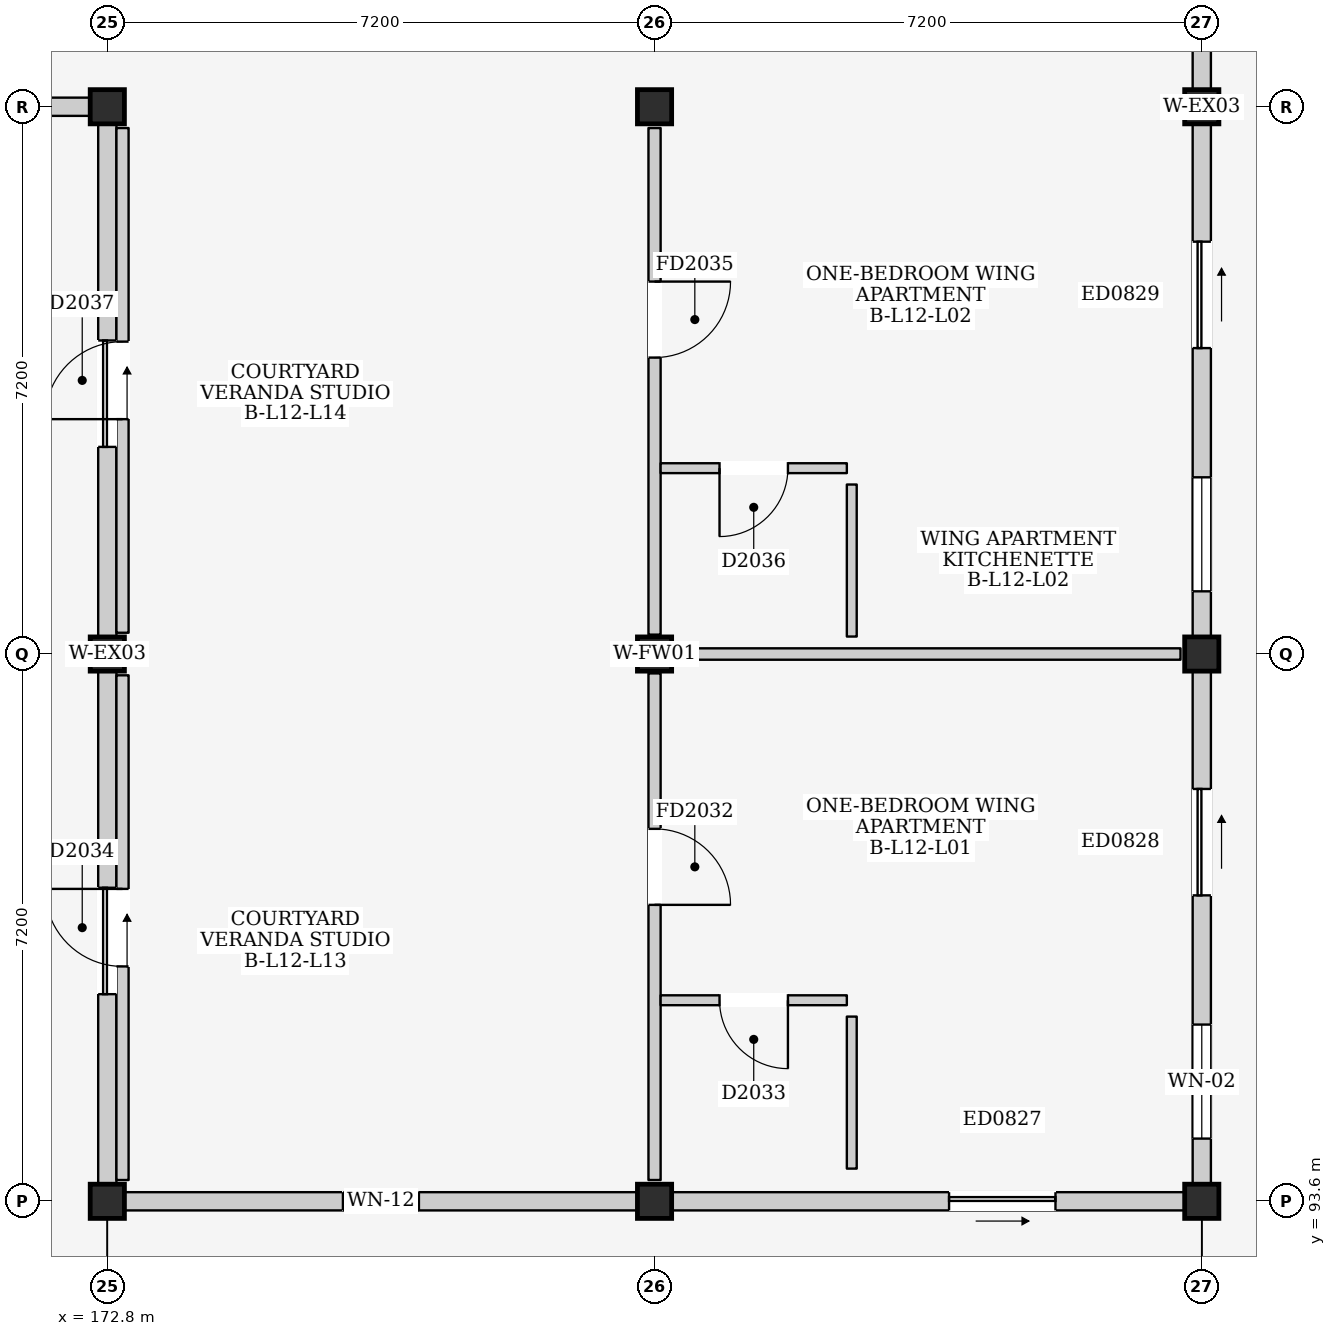
"""IFC4 building model, lengths in metres.
Left out: names, types, materials, properties, quantities, classifications, styles, units other than length and angle.
Written with IfcOpenShell. Run it as: python <this file> out.ifc"""

import sys

from ifc_helpers import new_model, si_unit, direction, frame, frame_2d, origin, origin_2d, place, context, subcontext, project, spatial, rectangle, extrude, element, fill, save


model = new_model("IFC4")
c1 = context("Model", 3, precision=1e-05, world=origin(), true_north=direction((0.0, 1.0)))
c2 = subcontext(c1, "Body", "Model", "MODEL_VIEW")
j1 = project(units=[si_unit("LENGTHUNIT", "METRE"), si_unit("PLANEANGLEUNIT", "RADIAN")], contexts=[c1])
p1 = place(None, origin())
s1 = spatial("IfcSite", under=j1, at=p1, CompositionType="ELEMENT")
p2 = place(p1, origin())
s2 = spatial("IfcBuilding", under=s1, at=p2, CompositionType="ELEMENT")
p3 = place(p2, frame((0.0, 0.0, 41.2)))
s3 = spatial("IfcBuildingStorey", under=s2, at=p3, CompositionType="ELEMENT", Elevation=41.2)
for number, where, z_axis, x_axis in (
    (1, (172.8, 93.6, 0.0), (0.0, 0.0, 1.0), (1.0, 0.0, 0.0)),
    (2, (172.8, 100.8, 0.0), (0.0, 0.0, 1.0), (1.0, 0.0, 0.0)),
    (3, (172.8, 108.0, 0.0), (0.0, 0.0, 1.0), (1.0, 0.0, 0.0)),
    (4, (180.0, 93.6, 0.0), (0.0, 0.0, 1.0), (1.0, 0.0, 0.0)),
    (5, (180.0, 100.8, 0.0), (0.0, 0.0, 1.0), (1.0, 0.0, 0.0)),
    (6, (180.0, 108.0, 0.0), (0.0, 0.0, 1.0), (1.0, 0.0, 0.0)),
    (7, (187.2, 93.6, 0.0), (0.0, 0.0, 1.0), (1.0, 0.0, 0.0)),
    (8, (187.2, 100.8, 0.0), (0.0, 0.0, 1.0), (1.0, 0.0, 0.0)),
    (9, (187.2, 108.0, 0.0), (0.0, 0.0, 1.0), (1.0, 0.0, 0.0)),
):
    element("IfcColumn", number, at=place(p3, frame(where, z_axis=z_axis, x_axis=x_axis)), inside=s3, PredefinedType="COLUMN", context=c2, shape_type="SweptSolid", body=[
        extrude(rectangle(XDim=0.45, YDim=0.45, at=origin_2d()), origin(), (0.0, 0.0, 1.0), 3.2),
    ])
p4 = place(p3, frame((165.825, 108.0, 0.0), z_axis=(0.0, 0.0, 1.0), x_axis=(1.0, 0.0, 0.0)))
e10 = element("IfcWall", 10, at=p4, inside=s3, PredefinedType="ELEMENTEDWALL", context=c2, shape_type="SweptSolid", body=[
    extrude(rectangle(XDim=6.75, YDim=0.24, at=frame_2d((3.375, 0.0))), origin(), (0.0, 0.0, 1.0), 2.345),
])
p5 = place(p4, frame((2.875, 0.0, 1.2)))
e11 = element("IfcOpeningElement", 11, at=p5, cuts=e10, PredefinedType="OPENING", context=c2, shape_type="SweptSolid", body=[
    extrude(rectangle(XDim=1.0, YDim=0.9, at=frame_2d((0.5, 0.45))), frame((0.0, 0.135, 0.0), z_axis=(0.0, -1.0, 0.0), x_axis=(1.0, 0.0, 0.0)), (0.0, 0.0, 1.0), 0.27),
])
p6 = place(p3, frame((173.025, 93.6, 0.0), z_axis=(0.0, 0.0, 1.0), x_axis=(1.0, 0.0, 0.0)))
e12 = element("IfcWall", 12, at=p6, inside=s3, PredefinedType="ELEMENTEDWALL", context=c2, shape_type="SweptSolid", body=[
    extrude(rectangle(XDim=6.75, YDim=0.24, at=frame_2d((3.375, 0.0))), origin(), (0.0, 0.0, 1.0), 2.345),
])
p7 = place(p6, frame((2.875, 0.0, 1.1)))
e13 = element("IfcOpeningElement", 13, at=p7, cuts=e12, PredefinedType="OPENING", context=c2, shape_type="SweptSolid", body=[
    extrude(rectangle(XDim=1.0, YDim=0.9, at=frame_2d((0.5, 0.45))), frame((0.0, 0.135, 0.0), z_axis=(0.0, -1.0, 0.0), x_axis=(1.0, 0.0, 0.0)), (0.0, 0.0, 1.0), 0.27),
])
p8 = place(p3, frame((172.8, 93.825, 0.0), z_axis=(0.0, 0.0, 1.0), x_axis=(0.0, 1.0, 0.0)))
e14 = element("IfcWall", 14, at=p8, inside=s3, PredefinedType="ELEMENTEDWALL", context=c2, shape_type="SweptSolid", body=[
    extrude(rectangle(XDim=6.75, YDim=0.24, at=frame_2d((3.375, 0.0))), origin(), (0.0, 0.0, 1.0), 2.445),
])
p9 = place(p8, frame((2.5, 0.0, 0.0)))
e15 = element("IfcOpeningElement", 15, at=p9, cuts=e14, PredefinedType="OPENING", context=c2, shape_type="SweptSolid", body=[
    extrude(rectangle(XDim=1.4, YDim=2.1, at=frame_2d((0.7, 1.05))), frame((0.0, 0.135, 0.0), z_axis=(0.0, -1.0, 0.0), x_axis=(1.0, 0.0, 0.0)), (0.0, 0.0, 1.0), 0.27),
])
p10 = place(p3, frame((172.8, 101.025, 0.0), z_axis=(0.0, 0.0, 1.0), x_axis=(0.0, 1.0, 0.0)))
e16 = element("IfcWall", 16, at=p10, inside=s3, PredefinedType="ELEMENTEDWALL", context=c2, shape_type="SweptSolid", body=[
    extrude(rectangle(XDim=6.75, YDim=0.24, at=frame_2d((3.375, 0.0))), origin(), (0.0, 0.0, 1.0), 2.445),
])
p11 = place(p10, frame((2.5, 0.0, 0.0)))
e17 = element("IfcOpeningElement", 17, at=p11, cuts=e16, PredefinedType="OPENING", context=c2, shape_type="SweptSolid", body=[
    extrude(rectangle(XDim=1.4, YDim=2.1, at=frame_2d((0.7, 1.05))), frame((0.0, 0.135, 0.0), z_axis=(0.0, -1.0, 0.0), x_axis=(1.0, 0.0, 0.0)), (0.0, 0.0, 1.0), 0.27),
])
p12 = place(p3, frame((180.225, 93.6, 0.0), z_axis=(0.0, 0.0, 1.0), x_axis=(1.0, 0.0, 0.0)))
e18 = element("IfcWall", 18, at=p12, inside=s3, PredefinedType="ELEMENTEDWALL", context=c2, shape_type="SweptSolid", body=[
    extrude(rectangle(XDim=6.75, YDim=0.24, at=frame_2d((3.375, 0.0))), origin(), (0.0, 0.0, 1.0), 2.345),
])
p13 = place(p12, frame((3.65, 0.0, 0.0)))
e19 = element("IfcOpeningElement", 19, at=p13, cuts=e18, PredefinedType="OPENING", context=c2, shape_type="SweptSolid", body=[
    extrude(rectangle(XDim=1.4, YDim=2.1, at=frame_2d((0.7, 1.05))), frame((0.0, 0.135, 0.0), z_axis=(0.0, -1.0, 0.0), x_axis=(1.0, 0.0, 0.0)), (0.0, 0.0, 1.0), 0.27),
])
p14 = place(p3, frame((187.2, 93.825, 0.0), z_axis=(0.0, 0.0, 1.0), x_axis=(0.0, 1.0, 0.0)))
e20 = element("IfcWall", 20, at=p14, inside=s3, PredefinedType="ELEMENTEDWALL", context=c2, shape_type="SweptSolid", body=[
    extrude(rectangle(XDim=6.75, YDim=0.24, at=frame_2d((3.375, 0.0))), origin(), (0.0, 0.0, 1.0), 2.495),
])
p15 = place(p14, frame((3.8, 0.0, 0.0)))
e21 = element("IfcOpeningElement", 21, at=p15, cuts=e20, PredefinedType="OPENING", context=c2, shape_type="SweptSolid", body=[
    extrude(rectangle(XDim=1.4, YDim=2.1, at=frame_2d((0.7, 1.05))), frame((0.0, 0.135, 0.0), z_axis=(0.0, -1.0, 0.0), x_axis=(1.0, 0.0, 0.0)), (0.0, 0.0, 1.0), 0.27),
])
p16 = place(p14, frame((0.6, 0.0, 0.88)))
e22 = element("IfcOpeningElement", 22, at=p16, cuts=e20, PredefinedType="OPENING", context=c2, shape_type="SweptSolid", body=[
    extrude(rectangle(XDim=1.5, YDim=1.5, at=frame_2d((0.75, 0.75))), frame((0.0, 0.135, 0.0), z_axis=(0.0, -1.0, 0.0), x_axis=(1.0, 0.0, 0.0)), (0.0, 0.0, 1.0), 0.27),
])
p17 = place(p3, frame((187.2, 101.025, 0.0), z_axis=(0.0, 0.0, 1.0), x_axis=(0.0, 1.0, 0.0)))
e23 = element("IfcWall", 23, at=p17, inside=s3, PredefinedType="ELEMENTEDWALL", context=c2, shape_type="SweptSolid", body=[
    extrude(rectangle(XDim=6.75, YDim=0.24, at=frame_2d((3.375, 0.0))), origin(), (0.0, 0.0, 1.0), 2.495),
])
p18 = place(p17, frame((3.8, 0.0, 0.0)))
e24 = element("IfcOpeningElement", 24, at=p18, cuts=e23, PredefinedType="OPENING", context=c2, shape_type="SweptSolid", body=[
    extrude(rectangle(XDim=1.4, YDim=2.1, at=frame_2d((0.7, 1.05))), frame((0.0, 0.135, 0.0), z_axis=(0.0, -1.0, 0.0), x_axis=(1.0, 0.0, 0.0)), (0.0, 0.0, 1.0), 0.27),
])
p19 = place(p17, frame((0.6, 0.0, 0.88)))
e25 = element("IfcOpeningElement", 25, at=p19, cuts=e23, PredefinedType="OPENING", context=c2, shape_type="SweptSolid", body=[
    extrude(rectangle(XDim=1.5, YDim=1.5, at=frame_2d((0.75, 0.75))), frame((0.0, 0.135, 0.0), z_axis=(0.0, -1.0, 0.0), x_axis=(1.0, 0.0, 0.0)), (0.0, 0.0, 1.0), 0.27),
])
p20 = place(p3, frame((187.2, 108.225, 0.0), z_axis=(0.0, 0.0, 1.0), x_axis=(0.0, 1.0, 0.0)))
e26 = element("IfcWall", 26, at=p20, inside=s3, PredefinedType="ELEMENTEDWALL", context=c2, shape_type="SweptSolid", body=[
    extrude(rectangle(XDim=6.75, YDim=0.24, at=frame_2d((3.375, 0.0))), origin(), (0.0, 0.0, 1.0), 2.495),
])
p21 = place(p20, frame((3.65, 0.0, 0.0)))
e27 = element("IfcOpeningElement", 27, at=p21, cuts=e26, PredefinedType="OPENING", context=c2, shape_type="SweptSolid", body=[
    extrude(rectangle(XDim=1.4, YDim=2.1, at=frame_2d((0.7, 1.05))), frame((0.0, 0.135, 0.0), z_axis=(0.0, -1.0, 0.0), x_axis=(1.0, 0.0, 0.0)), (0.0, 0.0, 1.0), 0.27),
])
p22 = place(p3, frame((180.0, 93.88, 0.0), z_axis=(0.0, 0.0, 1.0), x_axis=(0.0, 1.0, 0.0)))
e28 = element("IfcWall", 28, at=p22, inside=s3, PredefinedType="PARTITIONING", context=c2, shape_type="SweptSolid", body=[
    extrude(rectangle(XDim=6.665, YDim=0.16, at=frame_2d((3.333, 0.0))), origin(), (0.0, 0.0, 1.0), 2.445),
])
p23 = place(p22, frame((3.62, 0.0, 0.0)))
e29 = element("IfcOpeningElement", 29, at=p23, cuts=e28, PredefinedType="OPENING", context=c2, shape_type="SweptSolid", body=[
    extrude(rectangle(XDim=1.0, YDim=2.15, at=frame_2d((0.5, 1.075))), frame((0.0, 0.095, 0.0), z_axis=(0.0, -1.0, 0.0), x_axis=(1.0, 0.0, 0.0)), (0.0, 0.0, 1.0), 0.19),
])
p24 = place(p3, frame((180.28, 100.8, 0.0), z_axis=(0.0, 0.0, 1.0), x_axis=(1.0, 0.0, 0.0)))
e30 = element("IfcWall", 30, at=p24, inside=s3, PredefinedType="PARTITIONING", context=c2, shape_type="SweptSolid", body=[
    extrude(rectangle(XDim=6.64, YDim=0.15, at=frame_2d((3.32, 0.0))), origin(), (0.0, 0.0, 1.0), 2.345),
])
p25 = place(p3, frame((180.08, 96.245, 0.0), z_axis=(0.0, 0.0, 1.0), x_axis=(1.0, 0.0, 0.0)))
e31 = element("IfcWall", 31, at=p25, inside=s3, PredefinedType="PARTITIONING", context=c2, shape_type="SweptSolid", body=[
    extrude(rectangle(XDim=2.45, YDim=0.13, at=frame_2d((1.225, 0.0))), origin(), (0.0, 0.0, 1.0), 2.95),
])
p26 = place(p25, frame((0.775, 0.0, 0.0)))
e32 = element("IfcOpeningElement", 32, at=p26, cuts=e31, PredefinedType="OPENING", context=c2, shape_type="SweptSolid", body=[
    extrude(rectangle(XDim=0.9, YDim=2.1, at=frame_2d((0.45, 1.05))), frame((0.0, 0.08, 0.0), z_axis=(0.0, -1.0, 0.0), x_axis=(1.0, 0.0, 0.0)), (0.0, 0.0, 1.0), 0.16),
])
p27 = place(p3, frame((182.595, 94.03, 0.0), z_axis=(0.0, 0.0, 1.0), x_axis=(0.0, 1.0, 0.0)))
e33 = element("IfcWall", 33, at=p27, inside=s3, PredefinedType="PARTITIONING", context=c2, shape_type="SweptSolid", body=[
    extrude(rectangle(XDim=2.0, YDim=0.13, at=frame_2d((1.0, 0.0))), origin(), (0.0, 0.0, 1.0), 2.95),
])
p28 = place(p3, frame((173.0, 93.88, 0.0), z_axis=(0.0, 0.0, 1.0), x_axis=(0.0, 1.0, 0.0)))
e34 = element("IfcWall", 34, at=p28, inside=s3, PredefinedType="PARTITIONING", context=c2, shape_type="SweptSolid", body=[
    extrude(rectangle(XDim=6.64, YDim=0.16, at=frame_2d((3.32, 0.0))), origin(), (0.0, 0.0, 1.0), 2.95),
])
p29 = place(p28, frame((2.81, 0.0, 0.0)))
e35 = element("IfcOpeningElement", 35, at=p29, cuts=e34, PredefinedType="OPENING", context=c2, shape_type="SweptSolid", body=[
    extrude(rectangle(XDim=1.02, YDim=2.18, at=frame_2d((0.51, 1.09))), frame((0.0, 0.095, 0.0), z_axis=(0.0, -1.0, 0.0), x_axis=(1.0, 0.0, 0.0)), (0.0, 0.0, 1.0), 0.19),
])
p30 = place(p3, frame((180.0, 101.055, 0.0), z_axis=(0.0, 0.0, 1.0), x_axis=(0.0, 1.0, 0.0)))
e36 = element("IfcWall", 36, at=p30, inside=s3, PredefinedType="PARTITIONING", context=c2, shape_type="SweptSolid", body=[
    extrude(rectangle(XDim=6.665, YDim=0.16, at=frame_2d((3.333, 0.0))), origin(), (0.0, 0.0, 1.0), 2.445),
])
p31 = place(p30, frame((3.645, 0.0, 0.0)))
e37 = element("IfcOpeningElement", 37, at=p31, cuts=e36, PredefinedType="OPENING", context=c2, shape_type="SweptSolid", body=[
    extrude(rectangle(XDim=1.0, YDim=2.15, at=frame_2d((0.5, 1.075))), frame((0.0, 0.095, 0.0), z_axis=(0.0, -1.0, 0.0), x_axis=(1.0, 0.0, 0.0)), (0.0, 0.0, 1.0), 0.19),
])
p32 = place(p3, frame((180.08, 103.245, 0.0), z_axis=(0.0, 0.0, 1.0), x_axis=(1.0, 0.0, 0.0)))
e38 = element("IfcWall", 38, at=p32, inside=s3, PredefinedType="PARTITIONING", context=c2, shape_type="SweptSolid", body=[
    extrude(rectangle(XDim=2.45, YDim=0.13, at=frame_2d((1.225, 0.0))), origin(), (0.0, 0.0, 1.0), 2.95),
])
p33 = place(p32, frame((0.775, 0.0, 0.0)))
e39 = element("IfcOpeningElement", 39, at=p33, cuts=e38, PredefinedType="OPENING", context=c2, shape_type="SweptSolid", body=[
    extrude(rectangle(XDim=0.9, YDim=2.1, at=frame_2d((0.45, 1.05))), frame((0.0, 0.08, 0.0), z_axis=(0.0, -1.0, 0.0), x_axis=(1.0, 0.0, 0.0)), (0.0, 0.0, 1.0), 0.16),
])
p34 = place(p3, frame((182.595, 101.03, 0.0), z_axis=(0.0, 0.0, 1.0), x_axis=(0.0, 1.0, 0.0)))
e40 = element("IfcWall", 40, at=p34, inside=s3, PredefinedType="PARTITIONING", context=c2, shape_type="SweptSolid", body=[
    extrude(rectangle(XDim=2.0, YDim=0.13, at=frame_2d((1.0, 0.0))), origin(), (0.0, 0.0, 1.0), 2.95),
])
p35 = place(p3, frame((173.0, 101.08, 0.0), z_axis=(0.0, 0.0, 1.0), x_axis=(0.0, 1.0, 0.0)))
e41 = element("IfcWall", 41, at=p35, inside=s3, PredefinedType="PARTITIONING", context=c2, shape_type="SweptSolid", body=[
    extrude(rectangle(XDim=6.64, YDim=0.16, at=frame_2d((3.32, 0.0))), origin(), (0.0, 0.0, 1.0), 2.95),
])
p36 = place(p35, frame((2.81, 0.0, 0.0)))
e42 = element("IfcOpeningElement", 42, at=p36, cuts=e41, PredefinedType="OPENING", context=c2, shape_type="SweptSolid", body=[
    extrude(rectangle(XDim=1.02, YDim=2.18, at=frame_2d((0.51, 1.09))), frame((0.0, 0.095, 0.0), z_axis=(0.0, -1.0, 0.0), x_axis=(1.0, 0.0, 0.0)), (0.0, 0.0, 1.0), 0.19),
])
p37 = place(p7, origin())
e43 = element("IfcWindow", 43, at=p37, inside=s3, PartitioningType="SINGLE_PANEL", PredefinedType="WINDOW", context=c2, shape_type="SweptSolid", body=[
    extrude(rectangle(XDim=1.0, YDim=0.9, at=frame_2d((0.5, 0.45))), frame((0.0, 0.03, 0.0), z_axis=(0.0, -1.0, 0.0), x_axis=(1.0, 0.0, 0.0)), (0.0, 0.0, 1.0), 0.06),
])
fill(e13, e43)
p38 = place(p9, frame((1.4, 0.0, 0.0), z_axis=(0.0, 0.0, 1.0), x_axis=(-1.0, 0.0, 0.0)))
e44 = element("IfcDoor", 44, at=p38, inside=s3, OperationType="SLIDING_TO_RIGHT", PredefinedType="DOOR", context=c2, shape_type="SweptSolid", body=[
    extrude(rectangle(XDim=1.4, YDim=2.1, at=frame_2d((0.7, 1.05))), frame((0.0, 0.025, 0.0), z_axis=(0.0, -1.0, 0.0), x_axis=(1.0, 0.0, 0.0)), (0.0, 0.0, 1.0), 0.05),
])
fill(e15, e44)
p39 = place(p11, frame((1.4, 0.0, 0.0), z_axis=(0.0, 0.0, 1.0), x_axis=(-1.0, 0.0, 0.0)))
e45 = element("IfcDoor", 45, at=p39, inside=s3, OperationType="SLIDING_TO_RIGHT", PredefinedType="DOOR", context=c2, shape_type="SweptSolid", body=[
    extrude(rectangle(XDim=1.4, YDim=2.1, at=frame_2d((0.7, 1.05))), frame((0.0, 0.025, 0.0), z_axis=(0.0, -1.0, 0.0), x_axis=(1.0, 0.0, 0.0)), (0.0, 0.0, 1.0), 0.05),
])
fill(e17, e45)
p40 = place(p13, frame((1.4, 0.0, 0.0), z_axis=(0.0, 0.0, 1.0), x_axis=(-1.0, 0.0, 0.0)))
e46 = element("IfcDoor", 46, at=p40, inside=s3, OperationType="SLIDING_TO_RIGHT", PredefinedType="DOOR", context=c2, shape_type="SweptSolid", body=[
    extrude(rectangle(XDim=1.4, YDim=2.1, at=frame_2d((0.7, 1.05))), frame((0.0, 0.025, 0.0), z_axis=(0.0, -1.0, 0.0), x_axis=(1.0, 0.0, 0.0)), (0.0, 0.0, 1.0), 0.05),
])
fill(e19, e46)
p41 = place(p15, frame((1.4, 0.0, 0.0), z_axis=(0.0, 0.0, 1.0), x_axis=(-1.0, 0.0, 0.0)))
e47 = element("IfcDoor", 47, at=p41, inside=s3, OperationType="SLIDING_TO_RIGHT", PredefinedType="DOOR", context=c2, shape_type="SweptSolid", body=[
    extrude(rectangle(XDim=1.4, YDim=2.1, at=frame_2d((0.7, 1.05))), frame((0.0, 0.025, 0.0), z_axis=(0.0, -1.0, 0.0), x_axis=(1.0, 0.0, 0.0)), (0.0, 0.0, 1.0), 0.05),
])
fill(e21, e47)
p42 = place(p16, origin())
e48 = element("IfcWindow", 48, at=p42, inside=s3, PartitioningType="DOUBLE_PANEL_VERTICAL", PredefinedType="WINDOW", context=c2, shape_type="SweptSolid", body=[
    extrude(rectangle(XDim=1.5, YDim=1.5, at=frame_2d((0.75, 0.75))), frame((0.0, 0.03, 0.0), z_axis=(0.0, -1.0, 0.0), x_axis=(1.0, 0.0, 0.0)), (0.0, 0.0, 1.0), 0.06),
])
fill(e22, e48)
p43 = place(p18, frame((1.4, 0.0, 0.0), z_axis=(0.0, 0.0, 1.0), x_axis=(-1.0, 0.0, 0.0)))
e49 = element("IfcDoor", 49, at=p43, inside=s3, OperationType="SLIDING_TO_RIGHT", PredefinedType="DOOR", context=c2, shape_type="SweptSolid", body=[
    extrude(rectangle(XDim=1.4, YDim=2.1, at=frame_2d((0.7, 1.05))), frame((0.0, 0.025, 0.0), z_axis=(0.0, -1.0, 0.0), x_axis=(1.0, 0.0, 0.0)), (0.0, 0.0, 1.0), 0.05),
])
fill(e24, e49)
p44 = place(p19, origin())
e50 = element("IfcWindow", 50, at=p44, inside=s3, PartitioningType="DOUBLE_PANEL_VERTICAL", PredefinedType="WINDOW", context=c2, shape_type="SweptSolid", body=[
    extrude(rectangle(XDim=1.5, YDim=1.5, at=frame_2d((0.75, 0.75))), frame((0.0, 0.03, 0.0), z_axis=(0.0, -1.0, 0.0), x_axis=(1.0, 0.0, 0.0)), (0.0, 0.0, 1.0), 0.06),
])
fill(e25, e50)
p45 = place(p23, frame((1.0, 0.0, 0.0), z_axis=(0.0, 0.0, 1.0), x_axis=(-1.0, 0.0, 0.0)))
e51 = element("IfcDoor", 51, at=p45, inside=s3, OperationType="SINGLE_SWING_RIGHT", PredefinedType="DOOR", context=c2, shape_type="SweptSolid", body=[
    extrude(rectangle(XDim=1.0, YDim=2.15, at=frame_2d((0.5, 1.075))), frame((0.0, 0.025, 0.0), z_axis=(0.0, -1.0, 0.0), x_axis=(1.0, 0.0, 0.0)), (0.0, 0.0, 1.0), 0.05),
])
fill(e29, e51)
p46 = place(p26, frame((0.9, 0.0, 0.0), z_axis=(0.0, 0.0, 1.0), x_axis=(-1.0, 0.0, 0.0)))
e52 = element("IfcDoor", 52, at=p46, inside=s3, OperationType="SINGLE_SWING_LEFT", PredefinedType="DOOR", context=c2, shape_type="SweptSolid", body=[
    extrude(rectangle(XDim=0.9, YDim=2.1, at=frame_2d((0.45, 1.05))), frame((0.0, 0.025, 0.0), z_axis=(0.0, -1.0, 0.0), x_axis=(1.0, 0.0, 0.0)), (0.0, 0.0, 1.0), 0.05),
])
fill(e32, e52)
p47 = place(p29, origin())
e53 = element("IfcDoor", 53, at=p47, inside=s3, OperationType="SINGLE_SWING_RIGHT", PredefinedType="DOOR", context=c2, shape_type="SweptSolid", body=[
    extrude(rectangle(XDim=1.02, YDim=2.18, at=frame_2d((0.51, 1.09))), frame((0.0, 0.025, 0.0), z_axis=(0.0, -1.0, 0.0), x_axis=(1.0, 0.0, 0.0)), (0.0, 0.0, 1.0), 0.05),
])
fill(e35, e53)
p48 = place(p31, frame((1.0, 0.0, 0.0), z_axis=(0.0, 0.0, 1.0), x_axis=(-1.0, 0.0, 0.0)))
e54 = element("IfcDoor", 54, at=p48, inside=s3, OperationType="SINGLE_SWING_LEFT", PredefinedType="DOOR", context=c2, shape_type="SweptSolid", body=[
    extrude(rectangle(XDim=1.0, YDim=2.15, at=frame_2d((0.5, 1.075))), frame((0.0, 0.025, 0.0), z_axis=(0.0, -1.0, 0.0), x_axis=(1.0, 0.0, 0.0)), (0.0, 0.0, 1.0), 0.05),
])
fill(e37, e54)
p49 = place(p33, frame((0.9, 0.0, 0.0), z_axis=(0.0, 0.0, 1.0), x_axis=(-1.0, 0.0, 0.0)))
e55 = element("IfcDoor", 55, at=p49, inside=s3, OperationType="SINGLE_SWING_RIGHT", PredefinedType="DOOR", context=c2, shape_type="SweptSolid", body=[
    extrude(rectangle(XDim=0.9, YDim=2.1, at=frame_2d((0.45, 1.05))), frame((0.0, 0.025, 0.0), z_axis=(0.0, -1.0, 0.0), x_axis=(1.0, 0.0, 0.0)), (0.0, 0.0, 1.0), 0.05),
])
fill(e39, e55)
p50 = place(p36, origin())
e56 = element("IfcDoor", 56, at=p50, inside=s3, OperationType="SINGLE_SWING_LEFT", PredefinedType="DOOR", context=c2, shape_type="SweptSolid", body=[
    extrude(rectangle(XDim=1.02, YDim=2.18, at=frame_2d((0.51, 1.09))), frame((0.0, 0.025, 0.0), z_axis=(0.0, -1.0, 0.0), x_axis=(1.0, 0.0, 0.0)), (0.0, 0.0, 1.0), 0.05),
])
fill(e42, e56)
save(model, sys.argv[1])
